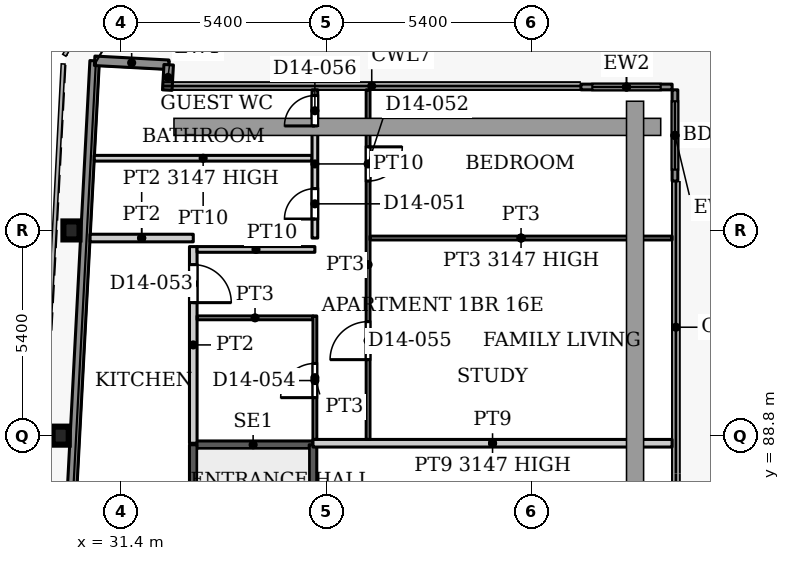
"""IFC4 building model, lengths in metres.
Left out: names, types, materials, properties, quantities, classifications, styles, units other than length and angle.
Written with IfcOpenShell. Run it as: python <this file> out.ifc"""

import sys

from ifc_helpers import new_model, si_unit, direction, frame, frame_2d, origin, origin_2d, place, context, subcontext, project, spatial, rectangle, i_section, extrude, source, transform, mapped, element, fill, save


model = new_model("IFC4")
c1 = context("Model", 3, precision=1e-05, world=origin(), true_north=direction((0.0, 1.0)))
c2 = subcontext(c1, "Body", "Model", "MODEL_VIEW")
j1 = project(units=[si_unit("LENGTHUNIT", "METRE"), si_unit("PLANEANGLEUNIT", "RADIAN")], contexts=[c1])
p1 = place(None, origin())
s1 = spatial("IfcSite", under=j1, at=p1, CompositionType="ELEMENT")
p2 = place(p1, origin())
s2 = spatial("IfcBuilding", under=s1, at=p2, CompositionType="ELEMENT")
p3 = place(p2, frame((0.0, 0.0, 69.5)))
s3 = spatial("IfcBuildingStorey", under=s2, at=p3, CompositionType="ELEMENT", Elevation=69.5)
for number, where, z_axis, x_axis in (
    (1, (29.811, 88.8, 0.0), (0.0, 0.0, 1.0), (1.0, 0.0, 0.0)),
    (2, (30.095, 94.2, 0.0), (0.0, 0.0, 1.0), (1.0, 0.0, 0.0)),
):
    element("IfcColumn", number, at=place(p3, frame(where, z_axis=z_axis, x_axis=x_axis)), inside=s3, PredefinedType="COLUMN", context=c2, shape_type="SweptSolid", body=[
        extrude(i_section(OverallWidth=0.424, OverallDepth=0.474, WebThickness=0.048, FlangeThickness=0.077, FilletRadius=0.014, at=origin_2d()), origin(), (0.0, 0.0, 1.0), 3.9),
    ])
p4 = place(p3, frame((27.195, 31.969, 0.0), z_axis=(0.0, 0.0, 1.0), x_axis=(0.052554995867, 0.998618031286, 0.0)))
e3 = element("IfcWall", 3, at=p4, inside=s3, PredefinedType="SOLIDWALL", context=c2, shape_type="SweptSolid", body=[
    extrude(rectangle(XDim=66.787, YDim=0.25, at=frame_2d((33.394, 0.0))), origin(), (0.0, 0.0, 1.0), 3.75),
])
p5 = place(p3, frame((30.705, 98.664, 0.0), z_axis=(0.0, 0.0, 1.0), x_axis=(0.998577785791, -0.053314216913, 0.0)))
e4 = element("IfcWall", 4, at=p5, inside=s3, PredefinedType="SOLIDWALL", context=c2, shape_type="SweptSolid", body=[
    extrude(rectangle(XDim=1.951, YDim=0.25, at=frame_2d((0.975, 0.0))), origin(), (0.0, 0.0, 1.0), 3.75),
])
p6 = place(p3, frame((32.653, 98.56, 0.0), z_axis=(0.0, 0.0, 1.0), x_axis=(-0.054093451632, -0.998535877418, 0.0)))
e5 = element("IfcWall", 5, at=p6, inside=s3, PredefinedType="SOLIDWALL", context=c2, shape_type="SweptSolid", body=[
    extrude(rectangle(XDim=0.668, YDim=0.25, at=frame_2d((0.334, 0.0))), origin(), (0.0, 0.0, 1.0), 3.75),
])
p7 = place(p3, frame((43.5, 97.975, 0.0), z_axis=(0.0, 0.0, 1.0), x_axis=(1.0, 0.0, 0.0)))
e6 = element("IfcWall", 6, at=p7, inside=s3, PredefinedType="SOLIDWALL", context=c2, shape_type="SweptSolid", body=[
    extrude(rectangle(XDim=2.4, YDim=0.15, at=frame_2d((1.2, 0.0))), origin(), (0.0, 0.0, 1.0), 3.75),
])
p8 = place(p7, frame((0.3, 0.0, 0.0)))
e7 = element("IfcOpeningElement", 7, at=p8, cuts=e6, PredefinedType="OPENING", context=c2, shape_type="SweptSolid", body=[
    extrude(rectangle(XDim=1.8, YDim=2.4, at=frame_2d((0.9, 1.2))), frame((0.0, 0.085, 0.0), z_axis=(0.0, -1.0, 0.0), x_axis=(1.0, 0.0, 0.0)), (0.0, 0.0, 1.0), 0.17),
])
p9 = place(p3, frame((45.975, 97.9, 0.0), z_axis=(0.0, 0.0, 1.0), x_axis=(0.0, -1.0, 0.0)))
e8 = element("IfcWall", 8, at=p9, inside=s3, PredefinedType="SOLIDWALL", context=c2, shape_type="SweptSolid", body=[
    extrude(rectangle(XDim=2.4, YDim=0.15, at=frame_2d((1.2, 0.0))), origin(), (0.0, 0.0, 1.0), 3.75),
])
p10 = place(p9, frame((0.3, 0.0, 0.0)))
e9 = element("IfcOpeningElement", 9, at=p10, cuts=e8, PredefinedType="OPENING", context=c2, shape_type="SweptSolid", body=[
    extrude(rectangle(XDim=1.8, YDim=2.4, at=frame_2d((0.9, 1.2))), frame((0.0, 0.085, 0.0), z_axis=(0.0, -1.0, 0.0), x_axis=(1.0, 0.0, 0.0)), (0.0, 0.0, 1.0), 0.17),
])
p11 = place(p3, frame((33.3, 88.56, 0.0), z_axis=(0.0, 0.0, 1.0), x_axis=(1.0, 0.0, 0.0)))
e10 = element("IfcWall", 10, at=p11, inside=s3, PredefinedType="SHEAR", context=c2, shape_type="SweptSolid", body=[
    extrude(rectangle(XDim=3.15, YDim=0.2, at=frame_2d((1.575, 0.0))), origin(), (0.0, 0.0, 1.0), 3.9),
])
p12 = place(p3, frame((33.3, 79.4, 0.0), z_axis=(0.0, 0.0, 1.0), x_axis=(0.0, 1.0, 0.0)))
e11 = element("IfcWall", 11, at=p12, inside=s3, PredefinedType="SHEAR", context=c2, shape_type="SweptSolid", body=[
    extrude(rectangle(XDim=9.16, YDim=0.2, at=frame_2d((4.58, 0.0))), origin(), (0.0, 0.0, 1.0), 3.9),
])
p13 = place(p12, frame((0.35, 0.0, 0.0)))
e12 = element("IfcOpeningElement", 12, at=p13, cuts=e11, PredefinedType="OPENING", context=c2, shape_type="SweptSolid", body=[
    extrude(rectangle(XDim=1.1, YDim=2.2, at=frame_2d((0.55, 1.1))), frame((0.0, 0.11, 0.0), z_axis=(0.0, -1.0, 0.0), x_axis=(1.0, 0.0, 0.0)), (0.0, 0.0, 1.0), 0.22),
])
p14 = place(p3, frame((36.45, 79.4, 0.0), z_axis=(0.0, 0.0, 1.0), x_axis=(0.0, 1.0, 0.0)))
e13 = element("IfcWall", 13, at=p14, inside=s3, PredefinedType="SHEAR", context=c2, shape_type="SweptSolid", body=[
    extrude(rectangle(XDim=9.16, YDim=0.2, at=frame_2d((4.58, 0.0))), origin(), (0.0, 0.0, 1.0), 3.9),
])
p15 = place(p3, frame((30.695, 96.1, 0.0), z_axis=(0.0, 0.0, 1.0), x_axis=(1.0, 0.0, 0.0)))
e14 = element("IfcWall", 14, at=p15, inside=s3, PredefinedType="PARTITIONING", context=c2, shape_type="SweptSolid", body=[
    extrude(rectangle(XDim=5.73, YDim=0.15, at=frame_2d((2.865, 0.0))), origin(), (0.0, 0.0, 1.0), 3.6),
])
p16 = place(p3, frame((30.585, 94.0, 0.0), z_axis=(0.0, 0.0, 1.0), x_axis=(1.0, 0.0, 0.0)))
e15 = element("IfcWall", 15, at=p16, inside=s3, PredefinedType="PARTITIONING", context=c2, shape_type="SweptSolid", body=[
    extrude(rectangle(XDim=2.715, YDim=0.2, at=frame_2d((1.358, 0.0))), origin(), (0.0, 0.0, 1.0), 3.147),
])
p17 = place(p3, frame((33.3, 88.6, 0.0), z_axis=(0.0, 0.0, 1.0), x_axis=(0.0, 1.0, 0.0)))
e16 = element("IfcWall", 16, at=p17, inside=s3, PredefinedType="PARTITIONING", context=c2, shape_type="SweptSolid", body=[
    extrude(rectangle(XDim=5.175, YDim=0.2, at=frame_2d((2.587, 0.0))), origin(), (0.0, 0.0, 1.0), 3.6),
])
p18 = place(p17, frame((3.7, 0.0, 0.0)))
e17 = element("IfcOpeningElement", 17, at=p18, cuts=e16, PredefinedType="OPENING", context=c2, shape_type="SweptSolid", body=[
    extrude(rectangle(XDim=1.0, YDim=2.1, at=frame_2d((0.5, 1.05))), frame((0.0, 0.11, 0.0), z_axis=(0.0, -1.0, 0.0), x_axis=(1.0, 0.0, 0.0)), (0.0, 0.0, 1.0), 0.22),
])
p19 = place(p3, frame((33.4, 91.9, 0.0), z_axis=(0.0, 0.0, 1.0), x_axis=(1.0, 0.0, 0.0)))
e18 = element("IfcWall", 18, at=p19, inside=s3, PredefinedType="PARTITIONING", context=c2, shape_type="SweptSolid", body=[
    extrude(rectangle(XDim=3.05, YDim=0.1, at=frame_2d((1.525, 0.0))), origin(), (0.0, 0.0, 1.0), 3.6),
])
p20 = place(p3, frame((33.4, 93.7, 0.0), z_axis=(0.0, 0.0, 1.0), x_axis=(1.0, 0.0, 0.0)))
e19 = element("IfcWall", 19, at=p20, inside=s3, PredefinedType="PARTITIONING", context=c2, shape_type="SweptSolid", body=[
    extrude(rectangle(XDim=3.1, YDim=0.15, at=frame_2d((1.55, 0.0))), origin(), (0.0, 0.0, 1.0), 3.6),
])
p21 = place(p3, frame((36.45, 88.6, 0.0), z_axis=(0.0, 0.0, 1.0), x_axis=(1.0, 0.0, 0.0)))
e20 = element("IfcWall", 20, at=p21, inside=s3, PredefinedType="PARTITIONING", context=c2, shape_type="SweptSolid", body=[
    extrude(rectangle(XDim=9.45, YDim=0.2, at=frame_2d((4.725, 0.0))), origin(), (0.0, 0.0, 1.0), 3.147),
])
p22 = place(p3, frame((36.5, 88.7, 0.0), z_axis=(0.0, 0.0, 1.0), x_axis=(0.0, 1.0, 0.0)))
e21 = element("IfcWall", 21, at=p22, inside=s3, PredefinedType="PARTITIONING", context=c2, shape_type="SweptSolid", body=[
    extrude(rectangle(XDim=3.25, YDim=0.1, at=frame_2d((1.625, 0.0))), origin(), (0.0, 0.0, 1.0), 3.6),
])
p23 = place(p22, frame((1.1, 0.0, 0.0)))
e22 = element("IfcOpeningElement", 22, at=p23, cuts=e21, PredefinedType="OPENING", context=c2, shape_type="SweptSolid", body=[
    extrude(rectangle(XDim=0.9, YDim=2.1, at=frame_2d((0.45, 1.05))), frame((0.0, 0.06, 0.0), z_axis=(0.0, -1.0, 0.0), x_axis=(1.0, 0.0, 0.0)), (0.0, 0.0, 1.0), 0.12),
])
p24 = place(p3, frame((36.5, 94.0, 0.0), z_axis=(0.0, 0.0, 1.0), x_axis=(0.0, 1.0, 0.0)))
e23 = element("IfcWall", 23, at=p24, inside=s3, PredefinedType="PARTITIONING", context=c2, shape_type="SweptSolid", body=[
    extrude(rectangle(XDim=3.9, YDim=0.15, at=frame_2d((1.95, 0.0))), origin(), (0.0, 0.0, 1.0), 3.6),
])
p25 = place(p24, frame((0.5, 0.0, 0.0)))
e24 = element("IfcOpeningElement", 24, at=p25, cuts=e23, PredefinedType="OPENING", context=c2, shape_type="SweptSolid", body=[
    extrude(rectangle(XDim=0.8, YDim=2.1, at=frame_2d((0.4, 1.05))), frame((0.0, 0.085, 0.0), z_axis=(0.0, -1.0, 0.0), x_axis=(1.0, 0.0, 0.0)), (0.0, 0.0, 1.0), 0.17),
])
p26 = place(p24, frame((2.95, 0.0, 0.0)))
e25 = element("IfcOpeningElement", 25, at=p26, cuts=e23, PredefinedType="OPENING", context=c2, shape_type="SweptSolid", body=[
    extrude(rectangle(XDim=0.8, YDim=2.1, at=frame_2d((0.4, 1.05))), frame((0.0, 0.085, 0.0), z_axis=(0.0, -1.0, 0.0), x_axis=(1.0, 0.0, 0.0)), (0.0, 0.0, 1.0), 0.17),
])
p27 = place(p3, frame((37.9, 88.7, 0.0), z_axis=(0.0, 0.0, 1.0), x_axis=(0.0, 1.0, 0.0)))
e26 = element("IfcWall", 26, at=p27, inside=s3, PredefinedType="PARTITIONING", context=c2, shape_type="SweptSolid", body=[
    extrude(rectangle(XDim=9.2, YDim=0.1, at=frame_2d((4.6, 0.0))), origin(), (0.0, 0.0, 1.0), 3.6),
])
p28 = place(p27, frame((6.8, 0.0, 0.0)))
e27 = element("IfcOpeningElement", 27, at=p28, cuts=e26, PredefinedType="OPENING", context=c2, shape_type="SweptSolid", body=[
    extrude(rectangle(XDim=0.9, YDim=2.1, at=frame_2d((0.45, 1.05))), frame((0.0, 0.06, 0.0), z_axis=(0.0, -1.0, 0.0), x_axis=(1.0, 0.0, 0.0)), (0.0, 0.0, 1.0), 0.12),
])
p29 = place(p27, frame((2.1, 0.0, 0.0)))
e28 = element("IfcOpeningElement", 28, at=p29, cuts=e26, PredefinedType="OPENING", context=c2, shape_type="SweptSolid", body=[
    extrude(rectangle(XDim=1.0, YDim=2.1, at=frame_2d((0.5, 1.05))), frame((0.0, 0.06, 0.0), z_axis=(0.0, -1.0, 0.0), x_axis=(1.0, 0.0, 0.0)), (0.0, 0.0, 1.0), 0.12),
])
p30 = place(p3, frame((37.95, 94.0, 0.0), z_axis=(0.0, 0.0, 1.0), x_axis=(1.0, 0.0, 0.0)))
e29 = element("IfcWall", 29, at=p30, inside=s3, PredefinedType="PARTITIONING", context=c2, shape_type="SweptSolid", body=[
    extrude(rectangle(XDim=7.95, YDim=0.1, at=frame_2d((3.975, 0.0))), origin(), (0.0, 0.0, 1.0), 3.147),
])
m1 = source(origin(), c2, "Body", "SweptSolid", [
    extrude(rectangle(XDim=1.8, YDim=2.4, at=frame_2d((0.9, 1.2))), frame((0.0, 0.025, 0.0), z_axis=(0.0, -1.0, 0.0), x_axis=(1.0, 0.0, 0.0)), (0.0, 0.0, 1.0), 0.05),
])
p31 = place(p8, origin())
e30 = element("IfcDoor", 30, at=p31, inside=s3, OperationType="SLIDING_TO_LEFT", PredefinedType="DOOR", context=c2, shape_type="MappedRepresentation", body=[
    mapped(m1, transform((0.0, 0.0, 0.0), x_axis=(1.0, 0.0, 0.0), y_axis=(0.0, 1.0, 0.0), z_axis=(0.0, 0.0, 1.0), scale=1.0)),
])
fill(e7, e30)
p32 = place(p10, origin())
e31 = element("IfcDoor", 31, at=p32, inside=s3, OperationType="SLIDING_TO_LEFT", PredefinedType="DOOR", context=c2, shape_type="MappedRepresentation", body=[
    mapped(m1, transform((0.0, 0.0, 0.0), x_axis=(1.0, 0.0, 0.0), y_axis=(0.0, 1.0, 0.0), z_axis=(0.0, 0.0, 1.0), scale=1.0)),
])
fill(e9, e31)
m2 = source(origin(), c2, "Body", "SweptSolid", [
    extrude(rectangle(XDim=0.8, YDim=2.1, at=frame_2d((0.4, 1.05))), frame((0.0, 0.025, 0.0), z_axis=(0.0, -1.0, 0.0), x_axis=(1.0, 0.0, 0.0)), (0.0, 0.0, 1.0), 0.05),
])
p33 = place(p25, origin())
e32 = element("IfcDoor", 32, at=p33, inside=s3, OperationType="SINGLE_SWING_LEFT", PredefinedType="DOOR", context=c2, shape_type="MappedRepresentation", body=[
    mapped(m2, transform((0.0, 0.0, 0.0), x_axis=(1.0, 0.0, 0.0), y_axis=(0.0, 1.0, 0.0), z_axis=(0.0, 0.0, 1.0), scale=1.0)),
])
fill(e24, e32)
m3 = source(origin(), c2, "Body", "SweptSolid", [
    extrude(rectangle(XDim=0.9, YDim=2.1, at=frame_2d((0.45, 1.05))), frame((0.0, 0.025, 0.0), z_axis=(0.0, -1.0, 0.0), x_axis=(1.0, 0.0, 0.0)), (0.0, 0.0, 1.0), 0.05),
])
p34 = place(p28, origin())
e33 = element("IfcDoor", 33, at=p34, inside=s3, OperationType="SINGLE_SWING_RIGHT", PredefinedType="DOOR", context=c2, shape_type="MappedRepresentation", body=[
    mapped(m3, transform((0.0, 0.0, 0.0), x_axis=(1.0, 0.0, 0.0), y_axis=(0.0, 1.0, 0.0), z_axis=(0.0, 0.0, 1.0), scale=1.0)),
])
fill(e27, e33)
m4 = source(origin(), c2, "Body", "SweptSolid", [
    extrude(rectangle(XDim=1.0, YDim=2.1, at=frame_2d((0.5, 1.05))), frame((0.0, 0.025, 0.0), z_axis=(0.0, -1.0, 0.0), x_axis=(1.0, 0.0, 0.0)), (0.0, 0.0, 1.0), 0.05),
])
p35 = place(p18, origin())
e34 = element("IfcDoor", 34, at=p35, inside=s3, OperationType="SINGLE_SWING_RIGHT", PredefinedType="DOOR", context=c2, shape_type="MappedRepresentation", body=[
    mapped(m4, transform((0.0, 0.0, 0.0), x_axis=(1.0, 0.0, 0.0), y_axis=(0.0, 1.0, 0.0), z_axis=(0.0, 0.0, 1.0), scale=1.0)),
])
fill(e17, e34)
p36 = place(p23, origin())
e35 = element("IfcDoor", 35, at=p36, inside=s3, OperationType="SINGLE_SWING_LEFT", PredefinedType="DOOR", context=c2, shape_type="MappedRepresentation", body=[
    mapped(m3, transform((0.0, 0.0, 0.0), x_axis=(1.0, 0.0, 0.0), y_axis=(0.0, 1.0, 0.0), z_axis=(0.0, 0.0, 1.0), scale=1.0)),
])
fill(e22, e35)
m5 = source(origin(), c2, "Body", "SweptSolid", [
    extrude(rectangle(XDim=1.0, YDim=2.1, at=frame_2d((0.5, 1.05))), frame((0.0, 0.025, 0.0), z_axis=(0.0, -1.0, 0.0), x_axis=(1.0, 0.0, 0.0)), (0.0, 0.0, 1.0), 0.05),
])
p37 = place(p29, origin())
e36 = element("IfcDoor", 36, at=p37, inside=s3, OperationType="SINGLE_SWING_LEFT", PredefinedType="DOOR", context=c2, shape_type="MappedRepresentation", body=[
    mapped(m5, transform((0.0, 0.0, 0.0), x_axis=(1.0, 0.0, 0.0), y_axis=(0.0, 1.0, 0.0), z_axis=(0.0, 0.0, 1.0), scale=1.0)),
])
fill(e28, e36)
p38 = place(p26, origin())
e37 = element("IfcDoor", 37, at=p38, inside=s3, OperationType="SINGLE_SWING_LEFT", PredefinedType="DOOR", context=c2, shape_type="MappedRepresentation", body=[
    mapped(m2, transform((0.0, 0.0, 0.0), x_axis=(1.0, 0.0, 0.0), y_axis=(0.0, 1.0, 0.0), z_axis=(0.0, 0.0, 1.0), scale=1.0)),
])
fill(e25, e37)
save(model, sys.argv[1])
